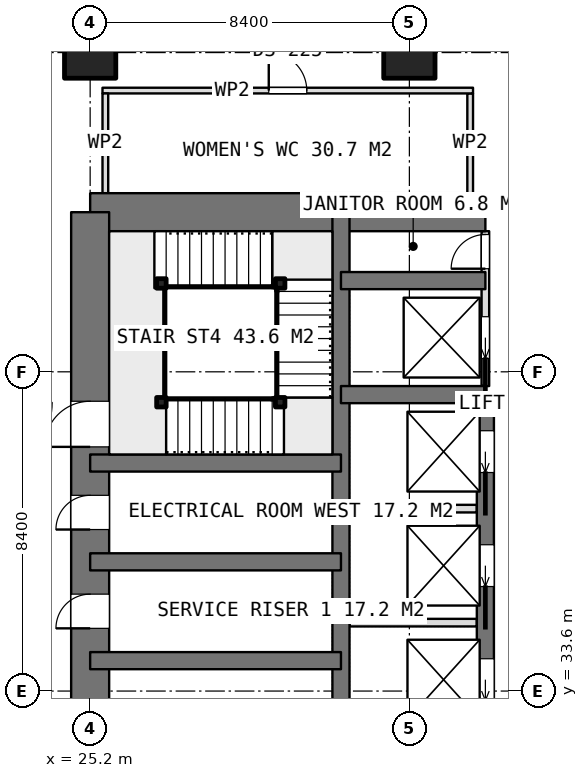
"""IFC4 building model, lengths in metres.
Left out: names, types, materials, properties, quantities, classifications, styles, units other than length and angle.
Written with IfcOpenShell. Run it as: python <this file> out.ifc"""

import sys

from ifc_helpers import new_model, si_unit, direction, frame, frame_2d, origin, origin_2d, place, context, subcontext, project, spatial, rectangle, extrude, element, fill, save


model = new_model("IFC4")
c1 = context("Model", 3, precision=1e-05, world=origin(), true_north=direction((0.0, 1.0)))
c2 = subcontext(c1, "Body", "Model", "MODEL_VIEW")
j1 = project(units=[si_unit("LENGTHUNIT", "METRE"), si_unit("PLANEANGLEUNIT", "RADIAN")], contexts=[c1])
p1 = place(None, origin())
s1 = spatial("IfcSite", under=j1, at=p1, CompositionType="ELEMENT")
p2 = place(p1, origin())
s2 = spatial("IfcBuilding", under=s1, at=p2, CompositionType="ELEMENT")
p3 = place(p2, frame((0.0, 0.0, 210.2)))
s3 = spatial("IfcBuildingStorey", under=s2, at=p3, CompositionType="ELEMENT", Elevation=210.2)
p4 = place(p3, frame((25.2, 46.2, 0.0), z_axis=(0.0, 0.0, 1.0), x_axis=(1.0, 0.0, 0.0)))
e1 = element("IfcWall", 1, at=p4, inside=s3, PredefinedType="SHEAR", context=c2, shape_type="SweptSolid", body=[
    extrude(rectangle(XDim=10.4, YDim=1.0, at=frame_2d((5.2, 0.0))), origin(), (0.0, 0.0, 1.0), 3.75),
])
p5 = place(p3, frame((25.2, 21.0, 0.0), z_axis=(0.0, 0.0, 1.0), x_axis=(0.0, 1.0, 0.0)))
e2 = element("IfcWall", 2, at=p5, inside=s3, PredefinedType="SHEAR", context=c2, shape_type="SweptSolid", body=[
    extrude(rectangle(XDim=25.2, YDim=1.0, at=frame_2d((12.6, 0.0))), origin(), (0.0, 0.0, 1.0), 3.75),
])
p6 = place(p5, frame((7.8, 0.0, 0.0)))
e3 = element("IfcOpeningElement", 3, at=p6, cuts=e2, PredefinedType="OPENING", context=c2, shape_type="SweptSolid", body=[
    extrude(rectangle(XDim=1.2, YDim=2.1, at=frame_2d((0.6, 1.05))), frame((0.0, 0.51, 0.0), z_axis=(0.0, -1.0, 0.0), x_axis=(1.0, 0.0, 0.0)), (0.0, 0.0, 1.0), 1.02),
])
p7 = place(p5, frame((14.25, 0.0, 0.0)))
e4 = element("IfcOpeningElement", 4, at=p7, cuts=e2, PredefinedType="OPENING", context=c2, shape_type="SweptSolid", body=[
    extrude(rectangle(XDim=0.9, YDim=2.1, at=frame_2d((0.45, 1.05))), frame((0.0, 0.51, 0.0), z_axis=(0.0, -1.0, 0.0), x_axis=(1.0, 0.0, 0.0)), (0.0, 0.0, 1.0), 1.02),
])
p8 = place(p5, frame((16.85, 0.0, 0.0)))
e5 = element("IfcOpeningElement", 5, at=p8, cuts=e2, PredefinedType="OPENING", context=c2, shape_type="SweptSolid", body=[
    extrude(rectangle(XDim=0.9, YDim=2.1, at=frame_2d((0.45, 1.05))), frame((0.0, 0.51, 0.0), z_axis=(0.0, -1.0, 0.0), x_axis=(1.0, 0.0, 0.0)), (0.0, 0.0, 1.0), 1.02),
])
p9 = place(p5, frame((19.025, 0.0, 0.0)))
e6 = element("IfcOpeningElement", 6, at=p9, cuts=e2, PredefinedType="OPENING", context=c2, shape_type="SweptSolid", body=[
    extrude(rectangle(XDim=1.2, YDim=2.1, at=frame_2d((0.6, 1.05))), frame((0.0, 0.51, 0.0), z_axis=(0.0, -1.0, 0.0), x_axis=(1.0, 0.0, 0.0)), (0.0, 0.0, 1.0), 1.02),
])
p10 = place(p3, frame((31.8, 21.0, 0.0), z_axis=(0.0, 0.0, 1.0), x_axis=(0.0, 1.0, 0.0)))
e7 = element("IfcWall", 7, at=p10, inside=s3, PredefinedType="SHEAR", context=c2, shape_type="SweptSolid", body=[
    extrude(rectangle(XDim=25.2, YDim=0.45, at=frame_2d((12.6, 0.0))), origin(), (0.0, 0.0, 1.0), 3.75),
])
p11 = place(p3, frame((35.6, 23.4, 0.0), z_axis=(0.0, 0.0, 1.0), x_axis=(0.0, 1.0, 0.0)))
e8 = element("IfcWall", 8, at=p11, inside=s3, PredefinedType="SHEAR", context=c2, shape_type="SweptSolid", body=[
    extrude(rectangle(XDim=18.0, YDim=0.45, at=frame_2d((9.0, 0.0))), origin(), (0.0, 0.0, 1.0), 3.75),
])
p12 = place(p11, frame((0.95, 0.0, 0.0)))
e9 = element("IfcOpeningElement", 9, at=p12, cuts=e8, PredefinedType="OPENING", context=c2, shape_type="SweptSolid", body=[
    extrude(rectangle(XDim=1.1, YDim=2.1, at=frame_2d((0.55, 1.05))), frame((0.0, 0.235, 0.0), z_axis=(0.0, -1.0, 0.0), x_axis=(1.0, 0.0, 0.0)), (0.0, 0.0, 1.0), 0.47),
])
p13 = place(p11, frame((3.95, 0.0, 0.0)))
e10 = element("IfcOpeningElement", 10, at=p13, cuts=e8, PredefinedType="OPENING", context=c2, shape_type="SweptSolid", body=[
    extrude(rectangle(XDim=1.1, YDim=2.1, at=frame_2d((0.55, 1.05))), frame((0.0, 0.235, 0.0), z_axis=(0.0, -1.0, 0.0), x_axis=(1.0, 0.0, 0.0)), (0.0, 0.0, 1.0), 0.47),
])
p14 = place(p11, frame((6.95, 0.0, 0.0)))
e11 = element("IfcOpeningElement", 11, at=p14, cuts=e8, PredefinedType="OPENING", context=c2, shape_type="SweptSolid", body=[
    extrude(rectangle(XDim=1.1, YDim=2.1, at=frame_2d((0.55, 1.05))), frame((0.0, 0.235, 0.0), z_axis=(0.0, -1.0, 0.0), x_axis=(1.0, 0.0, 0.0)), (0.0, 0.0, 1.0), 0.47),
])
p15 = place(p11, frame((9.95, 0.0, 0.0)))
e12 = element("IfcOpeningElement", 12, at=p15, cuts=e8, PredefinedType="OPENING", context=c2, shape_type="SweptSolid", body=[
    extrude(rectangle(XDim=1.1, YDim=2.1, at=frame_2d((0.55, 1.05))), frame((0.0, 0.235, 0.0), z_axis=(0.0, -1.0, 0.0), x_axis=(1.0, 0.0, 0.0)), (0.0, 0.0, 1.0), 0.47),
])
p16 = place(p11, frame((12.95, 0.0, 0.0)))
e13 = element("IfcOpeningElement", 13, at=p16, cuts=e8, PredefinedType="OPENING", context=c2, shape_type="SweptSolid", body=[
    extrude(rectangle(XDim=1.1, YDim=2.1, at=frame_2d((0.55, 1.05))), frame((0.0, 0.235, 0.0), z_axis=(0.0, -1.0, 0.0), x_axis=(1.0, 0.0, 0.0)), (0.0, 0.0, 1.0), 0.47),
])
p17 = place(p11, frame((15.95, 0.0, 0.0)))
e14 = element("IfcOpeningElement", 14, at=p17, cuts=e8, PredefinedType="OPENING", context=c2, shape_type="SweptSolid", body=[
    extrude(rectangle(XDim=1.1, YDim=2.1, at=frame_2d((0.55, 1.05))), frame((0.0, 0.235, 0.0), z_axis=(0.0, -1.0, 0.0), x_axis=(1.0, 0.0, 0.0)), (0.0, 0.0, 1.0), 0.47),
])
for number, where, z_axis, x_axis in (
    (15, (31.8, 41.4, 0.0), (0.0, 0.0, 1.0), (1.0, 0.0, 0.0)),
    (16, (31.8, 44.4, 0.0), (0.0, 0.0, 1.0), (1.0, 0.0, 0.0)),
):
    element("IfcWall", number, at=place(p3, frame(where, z_axis=z_axis, x_axis=x_axis)), inside=s3, PredefinedType="SHEAR", context=c2, shape_type="SweptSolid", body=[
        extrude(rectangle(XDim=3.8, YDim=0.45, at=frame_2d((1.9, 0.0))), origin(), (0.0, 0.0, 1.0), 3.75),
    ])
for number, where, z_axis, x_axis in (
    (17, (25.2, 34.4, 0.0), (0.0, 0.0, 1.0), (1.0, 0.0, 0.0)),
    (18, (25.2, 37.0, 0.0), (0.0, 0.0, 1.0), (1.0, 0.0, 0.0)),
    (19, (25.2, 39.6, 0.0), (0.0, 0.0, 1.0), (1.0, 0.0, 0.0)),
):
    element("IfcWall", number, at=place(p3, frame(where, z_axis=z_axis, x_axis=x_axis)), inside=s3, PredefinedType="SHEAR", context=c2, shape_type="SweptSolid", body=[
        extrude(rectangle(XDim=6.6, YDim=0.45, at=frame_2d((3.3, 0.0))), origin(), (0.0, 0.0, 1.0), 3.75),
    ])
for number, where, z_axis, x_axis in (
    (20, (25.2, 50.4, 0.0), (0.0, 0.0, 1.0), (1.0, 0.0, 0.0)),
    (21, (33.6, 50.4, 0.0), (0.0, 0.0, 1.0), (1.0, 0.0, 0.0)),
):
    element("IfcColumn", number, at=place(p3, frame(where, z_axis=z_axis, x_axis=x_axis)), inside=s3, PredefinedType="COLUMN", context=c2, shape_type="SweptSolid", body=[
        extrude(rectangle(XDim=1.35, YDim=1.35, at=origin_2d()), origin(), (0.0, 0.0, 1.0), 3.75),
    ])
for number, where, z_axis, x_axis in (
    (22, (32.025, 35.4, 0.0), (0.0, 0.0, 1.0), (1.0, 0.0, 0.0)),
    (23, (32.025, 38.4, 0.0), (0.0, 0.0, 1.0), (1.0, 0.0, 0.0)),
):
    element("IfcWall", number, at=place(p3, frame(where, z_axis=z_axis, x_axis=x_axis)), inside=s3, PredefinedType="PARTITIONING", context=c2, shape_type="SweptSolid", body=[
        extrude(rectangle(XDim=3.35, YDim=0.2, at=frame_2d((1.675, 0.0))), origin(), (0.0, 0.0, 1.0), 3.5),
    ])
p18 = place(p3, frame((35.6, 41.625, 0.0), z_axis=(0.0, 0.0, 1.0), x_axis=(0.0, 1.0, 0.0)))
e24 = element("IfcWall", 24, at=p18, inside=s3, PredefinedType="PARTITIONING", context=c2, shape_type="SweptSolid", body=[
    extrude(rectangle(XDim=4.075, YDim=0.2, at=frame_2d((2.038, 0.0))), origin(), (0.0, 0.0, 1.0), 3.5),
])
p19 = place(p18, frame((3.088, 0.0, 0.0)))
e25 = element("IfcOpeningElement", 25, at=p19, cuts=e24, PredefinedType="OPENING", context=c2, shape_type="SweptSolid", body=[
    extrude(rectangle(XDim=0.9, YDim=2.1, at=frame_2d((0.45, 1.05))), frame((0.0, 0.11, 0.0), z_axis=(0.0, -1.0, 0.0), x_axis=(1.0, 0.0, 0.0)), (0.0, 0.0, 1.0), 0.22),
])
p20 = place(p18, frame((0.725, 0.0, 0.0)))
e26 = element("IfcOpeningElement", 26, at=p20, cuts=e24, PredefinedType="OPENING", context=c2, shape_type="SweptSolid", body=[
    extrude(rectangle(XDim=1.1, YDim=2.1, at=frame_2d((0.55, 1.05))), frame((0.0, 0.11, 0.0), z_axis=(0.0, -1.0, 0.0), x_axis=(1.0, 0.0, 0.0)), (0.0, 0.0, 1.0), 0.22),
])
p21 = place(p3, frame((25.525, 49.4, 0.0), z_axis=(0.0, 0.0, 1.0), x_axis=(1.0, 0.0, 0.0)))
e27 = element("IfcWall", 27, at=p21, inside=s3, PredefinedType="PARTITIONING", context=c2, shape_type="SweptSolid", body=[
    extrude(rectangle(XDim=9.75, YDim=0.15, at=frame_2d((4.875, 0.0))), origin(), (0.0, 0.0, 1.0), 3.5),
])
p22 = place(p21, frame((4.375, 0.0, 0.0)))
e28 = element("IfcOpeningElement", 28, at=p22, cuts=e27, PredefinedType="OPENING", context=c2, shape_type="SweptSolid", body=[
    extrude(rectangle(XDim=1.0, YDim=2.1, at=frame_2d((0.5, 1.05))), frame((0.0, 0.085, 0.0), z_axis=(0.0, -1.0, 0.0), x_axis=(1.0, 0.0, 0.0)), (0.0, 0.0, 1.0), 0.17),
])
for number, where, z_axis, x_axis in (
    (29, (25.6, 46.7, 0.0), (0.0, 0.0, 1.0), (0.0, 1.0, 0.0)),
    (30, (35.2, 46.7, 0.0), (0.0, 0.0, 1.0), (0.0, 1.0, 0.0)),
):
    element("IfcWall", number, at=place(p3, frame(where, z_axis=z_axis, x_axis=x_axis)), inside=s3, PredefinedType="PARTITIONING", context=c2, shape_type="SweptSolid", body=[
        extrude(rectangle(XDim=2.625, YDim=0.15, at=frame_2d((1.312, 0.0))), origin(), (0.0, 0.0, 1.0), 3.5),
    ])
for number, where, z_axis, x_axis in (
    (31, (27.075, 41.2, 0.0), (0.0, 0.0, 1.0), (1.0, 0.0, 0.0)),
    (32, (30.2, 41.2, 0.0), (0.0, 0.0, 1.0), (1.0, 0.0, 0.0)),
    (33, (30.2, 44.325, 0.0), (0.0, 0.0, 1.0), (1.0, 0.0, 0.0)),
    (34, (27.075, 44.325, 0.0), (0.0, 0.0, 1.0), (1.0, 0.0, 0.0)),
):
    element("IfcColumn", number, at=place(p3, frame(where, z_axis=z_axis, x_axis=x_axis)), inside=s3, PredefinedType="COLUMN", context=c2, shape_type="SweptSolid", body=[
        extrude(rectangle(XDim=0.25, YDim=0.25, at=origin_2d()), origin(), (0.0, 0.0, 1.0), 3.75),
    ])
p23 = place(p7, origin())
e35 = element("IfcDoor", 35, at=p23, inside=s3, OperationType="SINGLE_SWING_LEFT", PredefinedType="DOOR", context=c2, shape_type="SweptSolid", body=[
    extrude(rectangle(XDim=0.9, YDim=2.1, at=frame_2d((0.45, 1.05))), frame((0.0, 0.025, 0.0), z_axis=(0.0, -1.0, 0.0), x_axis=(1.0, 0.0, 0.0)), (0.0, 0.0, 1.0), 0.05),
])
fill(e4, e35)
p24 = place(p8, origin())
e36 = element("IfcDoor", 36, at=p24, inside=s3, OperationType="SINGLE_SWING_LEFT", PredefinedType="DOOR", context=c2, shape_type="SweptSolid", body=[
    extrude(rectangle(XDim=0.9, YDim=2.1, at=frame_2d((0.45, 1.05))), frame((0.0, 0.025, 0.0), z_axis=(0.0, -1.0, 0.0), x_axis=(1.0, 0.0, 0.0)), (0.0, 0.0, 1.0), 0.05),
])
fill(e5, e36)
p25 = place(p19, origin())
e37 = element("IfcDoor", 37, at=p25, inside=s3, OperationType="SINGLE_SWING_LEFT", PredefinedType="DOOR", context=c2, shape_type="SweptSolid", body=[
    extrude(rectangle(XDim=0.9, YDim=2.1, at=frame_2d((0.45, 1.05))), frame((0.0, 0.025, 0.0), z_axis=(0.0, -1.0, 0.0), x_axis=(1.0, 0.0, 0.0)), (0.0, 0.0, 1.0), 0.05),
])
fill(e25, e37)
p26 = place(p15, origin())
e38 = element("IfcDoor", 38, at=p26, inside=s3, OperationType="SLIDING_TO_LEFT", PredefinedType="USERDEFINED", context=c2, shape_type="SweptSolid", body=[
    extrude(rectangle(XDim=1.1, YDim=2.1, at=frame_2d((0.55, 1.05))), frame((0.0, 0.025, 0.0), z_axis=(0.0, -1.0, 0.0), x_axis=(1.0, 0.0, 0.0)), (0.0, 0.0, 1.0), 0.05),
])
fill(e12, e38)
p27 = place(p16, origin())
e39 = element("IfcDoor", 39, at=p27, inside=s3, OperationType="SLIDING_TO_LEFT", PredefinedType="USERDEFINED", context=c2, shape_type="SweptSolid", body=[
    extrude(rectangle(XDim=1.1, YDim=2.1, at=frame_2d((0.55, 1.05))), frame((0.0, 0.025, 0.0), z_axis=(0.0, -1.0, 0.0), x_axis=(1.0, 0.0, 0.0)), (0.0, 0.0, 1.0), 0.05),
])
fill(e13, e39)
p28 = place(p17, origin())
e40 = element("IfcDoor", 40, at=p28, inside=s3, OperationType="SLIDING_TO_LEFT", PredefinedType="USERDEFINED", context=c2, shape_type="SweptSolid", body=[
    extrude(rectangle(XDim=1.1, YDim=2.1, at=frame_2d((0.55, 1.05))), frame((0.0, 0.025, 0.0), z_axis=(0.0, -1.0, 0.0), x_axis=(1.0, 0.0, 0.0)), (0.0, 0.0, 1.0), 0.05),
])
fill(e14, e40)
p29 = place(p20, origin())
e41 = element("IfcDoor", 41, at=p29, inside=s3, OperationType="SLIDING_TO_LEFT", PredefinedType="USERDEFINED", context=c2, shape_type="SweptSolid", body=[
    extrude(rectangle(XDim=1.1, YDim=2.1, at=frame_2d((0.55, 1.05))), frame((0.0, 0.025, 0.0), z_axis=(0.0, -1.0, 0.0), x_axis=(1.0, 0.0, 0.0)), (0.0, 0.0, 1.0), 0.05),
])
fill(e26, e41)
p30 = place(p22, origin())
e42 = element("IfcDoor", 42, at=p30, inside=s3, OperationType="SINGLE_SWING_LEFT", PredefinedType="DOOR", context=c2, shape_type="SweptSolid", body=[
    extrude(rectangle(XDim=1.0, YDim=2.1, at=frame_2d((0.5, 1.05))), frame((0.0, 0.025, 0.0), z_axis=(0.0, -1.0, 0.0), x_axis=(1.0, 0.0, 0.0)), (0.0, 0.0, 1.0), 0.05),
])
fill(e28, e42)
p31 = place(p9, origin())
e43 = element("IfcDoor", 43, at=p31, inside=s3, OperationType="SINGLE_SWING_RIGHT", PredefinedType="DOOR", context=c2, shape_type="SweptSolid", body=[
    extrude(rectangle(XDim=1.2, YDim=2.1, at=frame_2d((0.6, 1.05))), frame((0.0, 0.025, 0.0), z_axis=(0.0, -1.0, 0.0), x_axis=(1.0, 0.0, 0.0)), (0.0, 0.0, 1.0), 0.05),
])
fill(e6, e43)
save(model, sys.argv[1])
